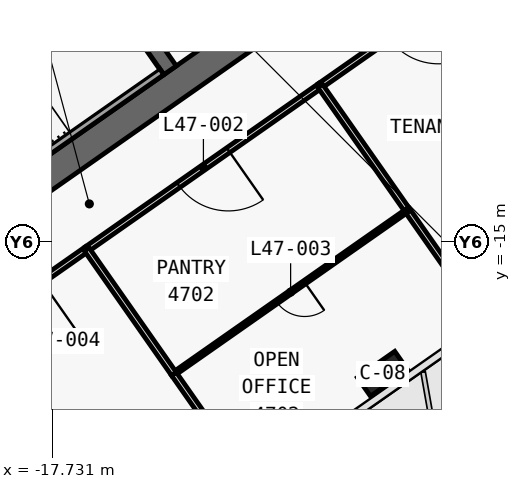
"""IFC4 building model, lengths in metres.
Left out: names, types, materials, properties, quantities, classifications, styles, units other than length and angle.
Written with IfcOpenShell. Run it as: python <this file> out.ifc"""

import sys

from ifc_helpers import new_model, si_unit, direction, frame, frame_2d, origin, origin_2d, place, context, subcontext, project, spatial, polyline, rectangle, outline, extrude, element, fill, save


model = new_model("IFC4")
c1 = context("Model", 3, precision=1e-05, world=origin(), true_north=direction((0.0, 1.0)))
c2 = subcontext(c1, "Body", "Model", "MODEL_VIEW")
j1 = project(units=[si_unit("LENGTHUNIT", "METRE"), si_unit("PLANEANGLEUNIT", "RADIAN")], contexts=[c1])
p1 = place(None, origin())
s1 = spatial("IfcSite", under=j1, at=p1, CompositionType="ELEMENT")
p2 = place(p1, origin())
s2 = spatial("IfcBuilding", under=s1, at=p2, CompositionType="ELEMENT")
p3 = place(p2, frame((0.0, 0.0, 202.2)))
s3 = spatial("IfcBuildingStorey", under=s2, at=p3, CompositionType="ELEMENT", Elevation=202.2)
p4 = place(p3, frame((0.029, -0.712, 0.0), z_axis=(0.0, 0.0, 1.0), x_axis=(-0.819151758019, -0.573576845187, 0.0)))
e1 = element("IfcWall", 1, at=p4, inside=s3, PredefinedType="SHEAR", context=c2, shape_type="SweptSolid", body=[
    extrude(outline(polyline([(26.616, 0.4), (0.56, 0.4), (-0.0, -0.4), (26.616, -0.4), (26.616, 0.4)])), origin(), (0.0, 0.0, 1.0), 3.9),
])
p5 = place(p4, frame((2.966, 0.0, 0.0)))
e2 = element("IfcOpeningElement", 2, at=p5, cuts=e1, PredefinedType="OPENING", context=c2, shape_type="SweptSolid", body=[
    extrude(rectangle(XDim=2.4, YDim=2.1, at=frame_2d((1.2, 1.05))), frame((0.0, 0.41, 0.0), z_axis=(0.0, -1.0, 0.0), x_axis=(1.0, 0.0, 0.0)), (0.0, 0.0, 1.0), 0.82),
])
p6 = place(p4, frame((11.916, 0.0, 0.0)))
e3 = element("IfcOpeningElement", 3, at=p6, cuts=e1, PredefinedType="OPENING", context=c2, shape_type="SweptSolid", body=[
    extrude(rectangle(XDim=2.4, YDim=2.1, at=frame_2d((1.2, 1.05))), frame((0.0, 0.41, 0.0), z_axis=(0.0, -1.0, 0.0), x_axis=(1.0, 0.0, 0.0)), (0.0, 0.0, 1.0), 0.82),
])
p7 = place(p3, frame((-14.63, -10.488, 0.0), z_axis=(0.0, 0.0, 1.0), x_axis=(-0.573611936273, 0.819127185829, 0.0)))
e4 = element("IfcWall", 4, at=p7, inside=s3, PredefinedType="SHEAR", context=c2, shape_type="SweptSolid", body=[
    extrude(outline(polyline([(4.6, 0.2), (0.0, 0.2), (0.0, -0.2), (4.6, -0.2), (4.6, 0.2)])), origin(), (0.0, 0.0, 1.0), 3.9),
])
p8 = place(p3, frame((-2.638, 3.768, 0.0), z_axis=(0.0, 0.0, 1.0), x_axis=(-0.81915267502, -0.573575535572, 0.0)))
e5 = element("IfcWall", 5, at=p8, inside=s3, PredefinedType="SHEAR", context=c2, shape_type="SweptSolid", body=[
    extrude(outline(polyline([(26.2, 0.2), (0.0, 0.2), (0.0, -0.2), (26.2, -0.2), (26.2, 0.2)])), origin(), (0.0, 0.0, 1.0), 3.9),
])
p9 = place(p8, frame((1.169, 0.0, 0.0)))
e6 = element("IfcOpeningElement", 6, at=p9, cuts=e5, PredefinedType="OPENING", context=c2, shape_type="SweptSolid", body=[
    extrude(rectangle(XDim=1.1, YDim=2.1, at=frame_2d((0.55, 1.05))), frame((0.0, 0.21, 0.0), z_axis=(0.0, -1.0, 0.0), x_axis=(1.0, 0.0, 0.0)), (0.0, 0.0, 1.0), 0.42),
])
p10 = place(p8, frame((3.206, 0.0, 0.0)))
e7 = element("IfcOpeningElement", 7, at=p10, cuts=e5, PredefinedType="OPENING", context=c2, shape_type="SweptSolid", body=[
    extrude(rectangle(XDim=1.1, YDim=2.1, at=frame_2d((0.55, 1.05))), frame((0.0, 0.21, 0.0), z_axis=(0.0, -1.0, 0.0), x_axis=(1.0, 0.0, 0.0)), (0.0, 0.0, 1.0), 0.42),
])
p11 = place(p8, frame((5.244, 0.0, 0.0)))
e8 = element("IfcOpeningElement", 8, at=p11, cuts=e5, PredefinedType="OPENING", context=c2, shape_type="SweptSolid", body=[
    extrude(rectangle(XDim=1.1, YDim=2.1, at=frame_2d((0.55, 1.05))), frame((0.0, 0.21, 0.0), z_axis=(0.0, -1.0, 0.0), x_axis=(1.0, 0.0, 0.0)), (0.0, 0.0, 1.0), 0.42),
])
p12 = place(p8, frame((7.281, 0.0, 0.0)))
e9 = element("IfcOpeningElement", 9, at=p12, cuts=e5, PredefinedType="OPENING", context=c2, shape_type="SweptSolid", body=[
    extrude(rectangle(XDim=1.1, YDim=2.1, at=frame_2d((0.55, 1.05))), frame((0.0, 0.21, 0.0), z_axis=(0.0, -1.0, 0.0), x_axis=(1.0, 0.0, 0.0)), (0.0, 0.0, 1.0), 0.42),
])
p13 = place(p8, frame((9.688, 0.0, 0.0)))
e10 = element("IfcOpeningElement", 10, at=p13, cuts=e5, PredefinedType="OPENING", context=c2, shape_type="SweptSolid", body=[
    extrude(rectangle(XDim=1.1, YDim=2.1, at=frame_2d((0.55, 1.05))), frame((0.0, 0.21, 0.0), z_axis=(0.0, -1.0, 0.0), x_axis=(1.0, 0.0, 0.0)), (0.0, 0.0, 1.0), 0.42),
])
p14 = place(p8, frame((11.863, 0.0, 0.0)))
e11 = element("IfcOpeningElement", 11, at=p14, cuts=e5, PredefinedType="OPENING", context=c2, shape_type="SweptSolid", body=[
    extrude(rectangle(XDim=1.1, YDim=2.1, at=frame_2d((0.55, 1.05))), frame((0.0, 0.21, 0.0), z_axis=(0.0, -1.0, 0.0), x_axis=(1.0, 0.0, 0.0)), (0.0, 0.0, 1.0), 0.42),
])
p15 = place(p8, frame((15.175, 0.0, 0.0)))
e12 = element("IfcOpeningElement", 12, at=p15, cuts=e5, PredefinedType="OPENING", context=c2, shape_type="SweptSolid", body=[
    extrude(rectangle(XDim=1.0, YDim=2.1, at=frame_2d((0.5, 1.05))), frame((0.0, 0.21, 0.0), z_axis=(0.0, -1.0, 0.0), x_axis=(1.0, 0.0, 0.0)), (0.0, 0.0, 1.0), 0.42),
])
p16 = place(p3, frame((-9.038, -18.475, 0.0), z_axis=(0.0, 0.0, 1.0), x_axis=(-0.819152044289, -0.573576436351, 0.0)))
e13 = element("IfcColumn", 13, at=p16, inside=s3, PredefinedType="COLUMN", context=c2, shape_type="SweptSolid", body=[
    extrude(rectangle(XDim=1.2, YDim=0.6, at=origin_2d()), origin(), (0.0, 0.0, 1.0), 3.9),
])
p17 = place(p3, frame((-14.851, -10.521, 0.0), z_axis=(0.0, 0.0, 1.0), x_axis=(-0.819141584393, -0.57359137434, 0.0)))
e14 = element("IfcWall", 14, at=p17, inside=s3, PredefinedType="SOLIDWALL", context=c2, shape_type="SweptSolid", body=[
    extrude(rectangle(XDim=8.0, YDim=0.2, at=frame_2d((4.0, 0.0))), origin(), (0.0, 0.0, 1.0), 3.62),
])
p18 = place(p3, frame((-5.766, -7.456, 0.0), z_axis=(0.0, 0.0, 1.0), x_axis=(-0.819147828287, -0.573582457378, 0.0)))
e15 = element("IfcWall", 15, at=p18, inside=s3, PredefinedType="PARTITIONING", context=c2, shape_type="SweptSolid", body=[
    extrude(rectangle(XDim=6.002, YDim=0.15, at=frame_2d((3.001, 0.0))), origin(), (0.0, 0.0, 1.0), 3.0),
])
p19 = place(p18, frame((2.201, 0.0, 0.0)))
e16 = element("IfcOpeningElement", 16, at=p19, cuts=e15, PredefinedType="OPENING", context=c2, shape_type="SweptSolid", body=[
    extrude(rectangle(XDim=1.6, YDim=2.1, at=frame_2d((0.8, 1.05))), frame((0.0, 0.085, 0.0), z_axis=(0.0, -1.0, 0.0), x_axis=(1.0, 0.0, 0.0)), (0.0, 0.0, 1.0), 0.17),
])
p20 = place(p3, frame((-10.68, -10.896, 0.0), z_axis=(0.0, 0.0, 1.0), x_axis=(-0.819138671238, -0.573595534573, 0.0)))
e17 = element("IfcWall", 17, at=p20, inside=s3, PredefinedType="PARTITIONING", context=c2, shape_type="SweptSolid", body=[
    extrude(rectangle(XDim=7.504, YDim=0.15, at=frame_2d((3.752, 0.0))), origin(), (0.0, 0.0, 1.0), 3.0),
])
p21 = place(p20, frame((2.952, 0.0, 0.0)))
e18 = element("IfcOpeningElement", 18, at=p21, cuts=e17, PredefinedType="OPENING", context=c2, shape_type="SweptSolid", body=[
    extrude(rectangle(XDim=1.6, YDim=2.1, at=frame_2d((0.8, 1.05))), frame((0.0, 0.085, 0.0), z_axis=(0.0, -1.0, 0.0), x_axis=(1.0, 0.0, 0.0)), (0.0, 0.0, 1.0), 0.17),
])
p22 = place(p3, frame((-16.823, -15.198, 0.0), z_axis=(0.0, 0.0, 1.0), x_axis=(-0.819165703328, -0.573556928727, 0.0)))
e19 = element("IfcWall", 19, at=p22, inside=s3, PredefinedType="PARTITIONING", context=c2, shape_type="SweptSolid", body=[
    extrude(rectangle(XDim=4.504, YDim=0.15, at=frame_2d((2.252, 0.0))), origin(), (0.0, 0.0, 1.0), 3.0),
])
p23 = place(p22, frame((1.452, 0.0, 0.0)))
e20 = element("IfcOpeningElement", 20, at=p23, cuts=e19, PredefinedType="OPENING", context=c2, shape_type="SweptSolid", body=[
    extrude(rectangle(XDim=1.6, YDim=2.1, at=frame_2d((0.8, 1.05))), frame((0.0, 0.085, 0.0), z_axis=(0.0, -1.0, 0.0), x_axis=(1.0, 0.0, 0.0)), (0.0, 0.0, 1.0), 0.17),
])
p24 = place(p3, frame((-6.379, -17.041, 0.0), z_axis=(0.0, 0.0, 1.0), x_axis=(-0.573560622794, 0.819163116834, 0.0)))
e21 = element("IfcWall", 21, at=p24, inside=s3, PredefinedType="PARTITIONING", context=c2, shape_type="SweptSolid", body=[
    extrude(rectangle(XDim=3.501, YDim=0.15, at=frame_2d((1.75, 0.0))), origin(), (0.0, 0.0, 1.0), 2.9),
])
p25 = place(p3, frame((-8.386, -14.176, 0.0), z_axis=(0.0, 0.0, 1.0), x_axis=(-0.573601535214, 0.819134469303, 0.0)))
e22 = element("IfcWall", 22, at=p25, inside=s3, PredefinedType="PARTITIONING", context=c2, shape_type="SweptSolid", body=[
    extrude(rectangle(XDim=4.002, YDim=0.15, at=frame_2d((2.001, 0.0))), origin(), (0.0, 0.0, 1.0), 3.62),
])
p26 = place(p3, frame((-8.386, -14.175, 0.0), z_axis=(0.0, 0.0, 1.0), x_axis=(-0.81915238829, -0.573575945067, 0.0)))
e23 = element("IfcWall", 23, at=p26, inside=s3, PredefinedType="PARTITIONING", context=c2, shape_type="SweptSolid", body=[
    extrude(rectangle(XDim=7.5, YDim=0.1, at=frame_2d((3.75, 0.0))), origin(), (0.0, 0.0, 1.0), 3.0),
])
p27 = place(p26, frame((3.3, 0.0, 0.0)))
e24 = element("IfcOpeningElement", 24, at=p27, cuts=e23, PredefinedType="OPENING", context=c2, shape_type="SweptSolid", body=[
    extrude(rectangle(XDim=0.9, YDim=2.1, at=frame_2d((0.45, 1.05))), frame((0.0, 0.06, 0.0), z_axis=(0.0, -1.0, 0.0), x_axis=(1.0, 0.0, 0.0)), (0.0, 0.0, 1.0), 0.12),
])
p28 = place(p3, frame((-12.523, -21.343, 0.0), z_axis=(0.0, 0.0, 1.0), x_axis=(-0.573555999232, 0.819166354134, 0.0)))
e25 = element("IfcWall", 25, at=p28, inside=s3, PredefinedType="PARTITIONING", context=c2, shape_type="SweptSolid", body=[
    extrude(rectangle(XDim=3.499, YDim=0.15, at=frame_2d((1.75, 0.0))), origin(), (0.0, 0.0, 1.0), 2.9),
])
p29 = place(p3, frame((-14.531, -18.476, 0.0), z_axis=(0.0, 0.0, 1.0), x_axis=(-0.573626190743, 0.819117203636, 0.0)))
e26 = element("IfcWall", 26, at=p29, inside=s3, PredefinedType="PARTITIONING", context=c2, shape_type="SweptSolid", body=[
    extrude(rectangle(XDim=4.0, YDim=0.15, at=frame_2d((2.0, 0.0))), origin(), (0.0, 0.0, 1.0), 3.62),
])
p30 = place(p3, frame((-16.594, -23.375, 0.0), z_axis=(0.0, 0.0, 1.0), x_axis=(-0.573577493031, 0.819151304393, 0.0)))
e27 = element("IfcWall", 27, at=p30, inside=s3, PredefinedType="PARTITIONING", context=c2, shape_type="SweptSolid", body=[
    extrude(rectangle(XDim=6.83, YDim=0.15, at=frame_2d((3.415, 0.0))), origin(), (0.0, 0.0, 1.0), 3.0),
])
p31 = place(p21, origin())
e28 = element("IfcDoor", 28, at=p31, inside=s3, OperationType="DOUBLE_DOOR_SINGLE_SWING", PredefinedType="DOOR", context=c2, shape_type="SweptSolid", body=[
    extrude(rectangle(XDim=1.6, YDim=2.1, at=frame_2d((0.8, 1.05))), frame((0.0, 0.025, 0.0), z_axis=(0.0, -1.0, 0.0), x_axis=(1.0, 0.0, 0.0)), (0.0, 0.0, 1.0), 0.05),
])
fill(e18, e28)
p32 = place(p27, origin())
e29 = element("IfcDoor", 29, at=p32, inside=s3, OperationType="SINGLE_SWING_LEFT", PredefinedType="DOOR", context=c2, shape_type="SweptSolid", body=[
    extrude(rectangle(XDim=0.9, YDim=2.1, at=frame_2d((0.45, 1.05))), frame((0.0, 0.025, 0.0), z_axis=(0.0, -1.0, 0.0), x_axis=(1.0, 0.0, 0.0)), (0.0, 0.0, 1.0), 0.05),
])
fill(e24, e29)
save(model, sys.argv[1])
